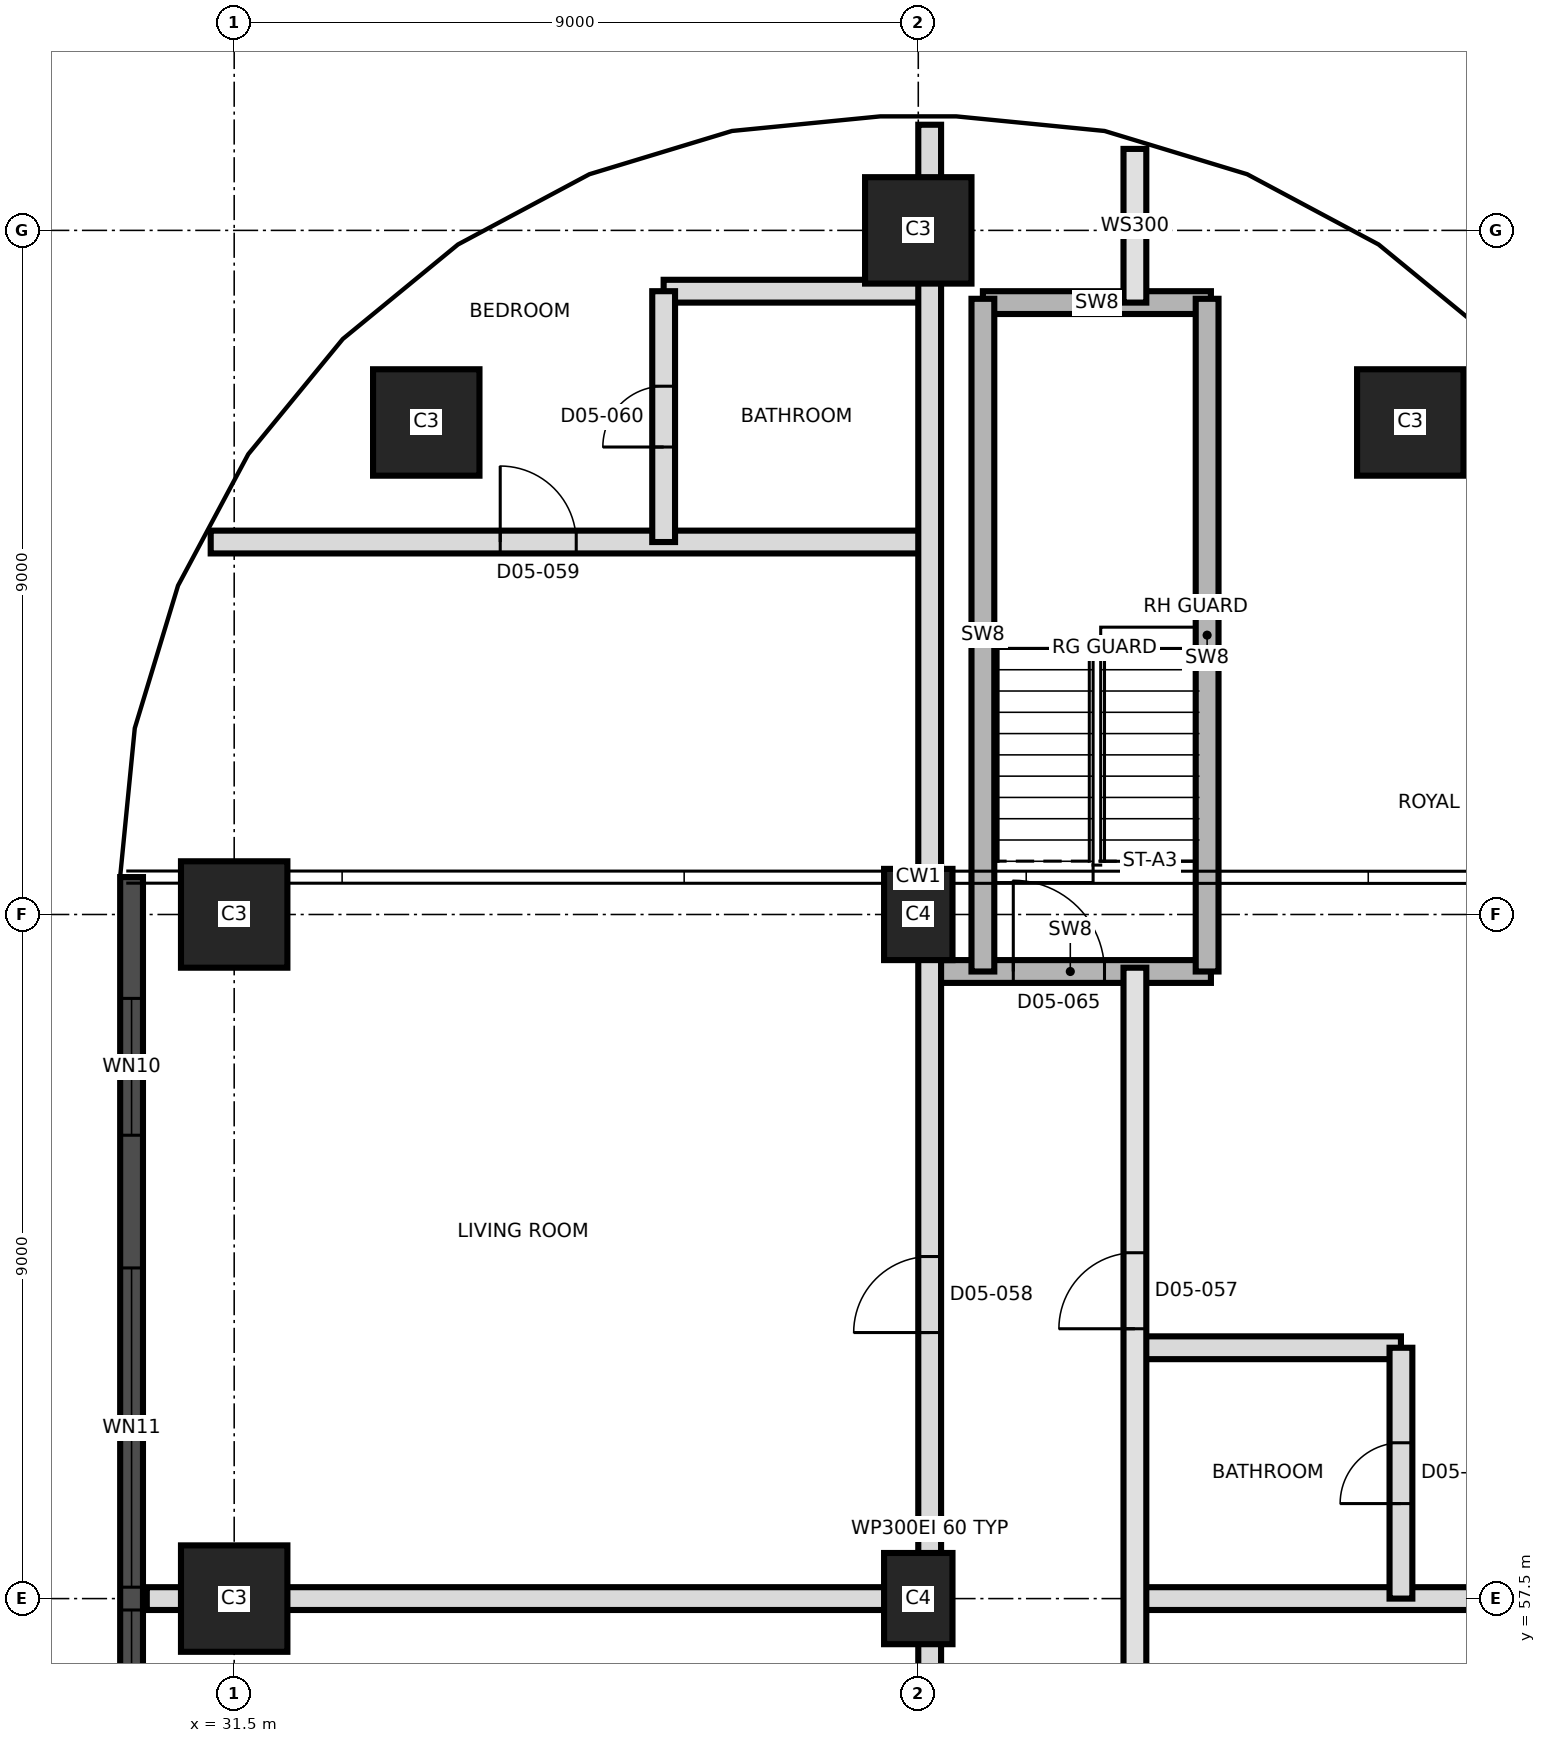
"""IFC4 building model, lengths in metres.
Left out: names, types, materials, properties, quantities, classifications, styles, units other than length and angle.
Written with IfcOpenShell. Run it as: python <this file> out.ifc"""

import sys

from ifc_helpers import new_model, si_unit, direction, frame, frame_2d, origin, origin_2d, place, context, subcontext, project, spatial, rectangle, extrude, element, fill, save


model = new_model("IFC4")
c1 = context("Model", 3, precision=1e-05, world=origin(), true_north=direction((0.0, 1.0)))
c2 = subcontext(c1, "Body", "Model", "MODEL_VIEW")
j1 = project(units=[si_unit("LENGTHUNIT", "METRE"), si_unit("PLANEANGLEUNIT", "RADIAN")], contexts=[c1])
p1 = place(None, origin())
s1 = spatial("IfcSite", under=j1, at=p1, CompositionType="ELEMENT")
p2 = place(p1, origin())
s2 = spatial("IfcBuilding", under=s1, at=p2, CompositionType="ELEMENT")
p3 = place(p2, frame((0.0, 0.0, 77.9)))
s3 = spatial("IfcBuildingStorey", under=s2, at=p3, CompositionType="ELEMENT", Elevation=77.9)
p4 = place(p3, frame((31.5, 57.5, 0.0), z_axis=(0.0, 0.0, 1.0), x_axis=(1.0, 0.0, 0.0)))
e1 = element("IfcColumn", 1, at=p4, inside=s3, PredefinedType="COLUMN", context=c2, shape_type="SweptSolid", body=[
    extrude(rectangle(XDim=1.4, YDim=1.4, at=origin_2d()), origin(), (0.0, 0.0, 1.0), 3.7),
])
p5 = place(p3, frame((40.5, 57.5, 0.0), z_axis=(0.0, 0.0, 1.0), x_axis=(0.0, 1.0, 0.0)))
e2 = element("IfcColumn", 2, at=p5, inside=s3, PredefinedType="COLUMN", context=c2, shape_type="SweptSolid", body=[
    extrude(rectangle(XDim=1.2, YDim=0.9, at=origin_2d()), origin(), (0.0, 0.0, 1.0), 3.7),
])
p6 = place(p3, frame((31.5, 66.5, 0.0), z_axis=(0.0, 0.0, 1.0), x_axis=(1.0, 0.0, 0.0)))
e3 = element("IfcColumn", 3, at=p6, inside=s3, PredefinedType="COLUMN", context=c2, shape_type="SweptSolid", body=[
    extrude(rectangle(XDim=1.4, YDim=1.4, at=origin_2d()), origin(), (0.0, 0.0, 1.0), 3.7),
])
p7 = place(p3, frame((40.5, 66.5, 0.0), z_axis=(0.0, 0.0, 1.0), x_axis=(0.0, 1.0, 0.0)))
e4 = element("IfcColumn", 4, at=p7, inside=s3, PredefinedType="COLUMN", context=c2, shape_type="SweptSolid", body=[
    extrude(rectangle(XDim=1.2, YDim=0.9, at=origin_2d()), origin(), (0.0, 0.0, 1.0), 3.7),
])
for number, where, z_axis, x_axis in (
    (5, (34.027, 72.973, 0.0), (0.0, 0.0, 1.0), (1.0, 0.0, 0.0)),
    (6, (46.973, 72.973, 0.0), (0.0, 0.0, 1.0), (1.0, 0.0, 0.0)),
    (7, (40.5, 75.5, 0.0), (0.0, 0.0, 1.0), (1.0, 0.0, 0.0)),
):
    element("IfcColumn", number, at=place(p3, frame(where, z_axis=z_axis, x_axis=x_axis)), inside=s3, PredefinedType="COLUMN", context=c2, shape_type="SweptSolid", body=[
        extrude(rectangle(XDim=1.4, YDim=1.4, at=origin_2d()), origin(), (0.0, 0.0, 1.0), 3.7),
    ])
p8 = place(p3, frame((30.15, 66.992, 0.0), z_axis=(0.0, 0.0, 1.0), x_axis=(0.0, -1.0, 0.0)))
e8 = element("IfcWall", 8, at=p8, inside=s3, PredefinedType="SOLIDWALL", context=c2, shape_type="SweptSolid", body=[
    extrude(rectangle(XDim=32.968, YDim=0.3, at=frame_2d((16.484, 0.0))), origin(), (0.0, 0.0, 1.0), 3.4),
])
p9 = place(p8, frame((1.596, 0.0, 0.3)))
e9 = element("IfcOpeningElement", 9, at=p9, cuts=e8, PredefinedType="OPENING", context=c2, shape_type="SweptSolid", body=[
    extrude(rectangle(XDim=1.8, YDim=2.4, at=frame_2d((0.9, 1.2))), frame((0.0, 0.16, 0.0), z_axis=(0.0, -1.0, 0.0), x_axis=(1.0, 0.0, 0.0)), (0.0, 0.0, 1.0), 0.32),
])
p10 = place(p8, frame((5.142, 0.0, 0.9)))
e10 = element("IfcOpeningElement", 10, at=p10, cuts=e8, PredefinedType="OPENING", context=c2, shape_type="SweptSolid", body=[
    extrude(rectangle(XDim=4.2, YDim=1.5, at=frame_2d((2.1, 0.75))), frame((0.0, 0.16, 0.0), z_axis=(0.0, -1.0, 0.0), x_axis=(1.0, 0.0, 0.0)), (0.0, 0.0, 1.0), 0.32),
])
p11 = place(p8, frame((9.642, 0.0, 0.9)))
e11 = element("IfcOpeningElement", 11, at=p11, cuts=e8, PredefinedType="OPENING", context=c2, shape_type="SweptSolid", body=[
    extrude(rectangle(XDim=4.2, YDim=1.5, at=frame_2d((2.1, 0.75))), frame((0.0, 0.16, 0.0), z_axis=(0.0, -1.0, 0.0), x_axis=(1.0, 0.0, 0.0)), (0.0, 0.0, 1.0), 0.32),
])
p12 = place(p8, frame((14.142, 0.0, 0.9)))
e12 = element("IfcOpeningElement", 12, at=p12, cuts=e8, PredefinedType="OPENING", context=c2, shape_type="SweptSolid", body=[
    extrude(rectangle(XDim=4.2, YDim=1.5, at=frame_2d((2.1, 0.75))), frame((0.0, 0.16, 0.0), z_axis=(0.0, -1.0, 0.0), x_axis=(1.0, 0.0, 0.0)), (0.0, 0.0, 1.0), 0.32),
])
p13 = place(p8, frame((18.642, 0.0, 0.9)))
e13 = element("IfcOpeningElement", 13, at=p13, cuts=e8, PredefinedType="OPENING", context=c2, shape_type="SweptSolid", body=[
    extrude(rectangle(XDim=4.2, YDim=1.5, at=frame_2d((2.1, 0.75))), frame((0.0, 0.16, 0.0), z_axis=(0.0, -1.0, 0.0), x_axis=(1.0, 0.0, 0.0)), (0.0, 0.0, 1.0), 0.32),
])
p14 = place(p8, frame((23.142, 0.0, 0.9)))
e14 = element("IfcOpeningElement", 14, at=p14, cuts=e8, PredefinedType="OPENING", context=c2, shape_type="SweptSolid", body=[
    extrude(rectangle(XDim=4.2, YDim=1.5, at=frame_2d((2.1, 0.75))), frame((0.0, 0.16, 0.0), z_axis=(0.0, -1.0, 0.0), x_axis=(1.0, 0.0, 0.0)), (0.0, 0.0, 1.0), 0.32),
])
p15 = place(p8, frame((29.33, 0.0, 0.3)))
e15 = element("IfcOpeningElement", 15, at=p15, cuts=e8, PredefinedType="OPENING", context=c2, shape_type="SweptSolid", body=[
    extrude(rectangle(XDim=1.8, YDim=2.4, at=frame_2d((0.9, 1.2))), frame((0.0, 0.16, 0.0), z_axis=(0.0, -1.0, 0.0), x_axis=(1.0, 0.0, 0.0)), (0.0, 0.0, 1.0), 0.32),
])
p16 = place(p3, frame((30.35, 57.5, 0.0), z_axis=(0.0, 0.0, 1.0), x_axis=(1.0, 0.0, 0.0)))
e16 = element("IfcWall", 16, at=p16, inside=s3, PredefinedType="PARTITIONING", context=c2, shape_type="SweptSolid", body=[
    extrude(rectangle(XDim=10.3, YDim=0.3, at=frame_2d((5.15, 0.0))), origin(), (0.0, 0.0, 1.0), 3.4),
])
p17 = place(p3, frame((43.35, 57.5, 0.0), z_axis=(0.0, 0.0, 1.0), x_axis=(1.0, 0.0, 0.0)))
e17 = element("IfcWall", 17, at=p17, inside=s3, PredefinedType="PARTITIONING", context=c2, shape_type="SweptSolid", body=[
    extrude(rectangle(XDim=7.48, YDim=0.3, at=frame_2d((3.74, 0.0))), origin(), (0.0, 0.0, 1.0), 3.4),
])
p18 = place(p3, frame((43.35, 60.8, 0.0), z_axis=(0.0, 0.0, 1.0), x_axis=(1.0, 0.0, 0.0)))
e18 = element("IfcWall", 18, at=p18, inside=s3, PredefinedType="PARTITIONING", context=c2, shape_type="SweptSolid", body=[
    extrude(rectangle(XDim=3.5, YDim=0.3, at=frame_2d((1.75, 0.0))), origin(), (0.0, 0.0, 1.0), 3.4),
])
p19 = place(p3, frame((40.65, 65.75, 0.0), z_axis=(0.0, 0.0, 1.0), x_axis=(1.0, 0.0, 0.0)))
e19 = element("IfcWall", 19, at=p19, inside=s3, PredefinedType="SHEAR", context=c2, shape_type="SweptSolid", body=[
    extrude(rectangle(XDim=3.7, YDim=0.3, at=frame_2d((1.85, 0.0))), origin(), (0.0, 0.0, 1.0), 3.4),
])
p20 = place(p19, frame((1.1, 0.0, 0.0)))
e20 = element("IfcOpeningElement", 20, at=p20, cuts=e19, PredefinedType="OPENING", context=c2, shape_type="SweptSolid", body=[
    extrude(rectangle(XDim=1.2, YDim=2.1, at=frame_2d((0.6, 1.05))), frame((0.0, 0.16, 0.0), z_axis=(0.0, -1.0, 0.0), x_axis=(1.0, 0.0, 0.0)), (0.0, 0.0, 1.0), 0.32),
])
p21 = place(p3, frame((31.191, 71.4, 0.0), z_axis=(0.0, 0.0, 1.0), x_axis=(1.0, 0.0, 0.0)))
e21 = element("IfcWall", 21, at=p21, inside=s3, PredefinedType="PARTITIONING", context=c2, shape_type="SweptSolid", body=[
    extrude(rectangle(XDim=9.459, YDim=0.3, at=frame_2d((4.729, 0.0))), origin(), (0.0, 0.0, 1.0), 3.4),
])
p22 = place(p21, frame((3.809, 0.0, 0.0)))
e22 = element("IfcOpeningElement", 22, at=p22, cuts=e21, PredefinedType="OPENING", context=c2, shape_type="SweptSolid", body=[
    extrude(rectangle(XDim=1.0, YDim=2.1, at=frame_2d((0.5, 1.05))), frame((0.0, 0.16, 0.0), z_axis=(0.0, -1.0, 0.0), x_axis=(1.0, 0.0, 0.0)), (0.0, 0.0, 1.0), 0.32),
])
p23 = place(p3, frame((41.35, 74.55, 0.0), z_axis=(0.0, 0.0, 1.0), x_axis=(1.0, 0.0, 0.0)))
e23 = element("IfcWall", 23, at=p23, inside=s3, PredefinedType="SHEAR", context=c2, shape_type="SweptSolid", body=[
    extrude(rectangle(XDim=3.0, YDim=0.3, at=frame_2d((1.5, 0.0))), origin(), (0.0, 0.0, 1.0), 3.4),
])
p24 = place(p3, frame((37.15, 74.7, 0.0), z_axis=(0.0, 0.0, 1.0), x_axis=(1.0, 0.0, 0.0)))
e24 = element("IfcWall", 24, at=p24, inside=s3, PredefinedType="PARTITIONING", context=c2, shape_type="SweptSolid", body=[
    extrude(rectangle(XDim=3.5, YDim=0.3, at=frame_2d((1.75, 0.0))), origin(), (0.0, 0.0, 1.0), 3.4),
])
p25 = place(p3, frame((37.15, 71.4, 0.0), z_axis=(0.0, 0.0, 1.0), x_axis=(0.0, 1.0, 0.0)))
e25 = element("IfcWall", 25, at=p25, inside=s3, PredefinedType="PARTITIONING", context=c2, shape_type="SweptSolid", body=[
    extrude(rectangle(XDim=3.3, YDim=0.3, at=frame_2d((1.65, 0.0))), origin(), (0.0, 0.0, 1.0), 3.4),
])
p26 = place(p25, frame((1.25, 0.0, 0.0)))
e26 = element("IfcOpeningElement", 26, at=p26, cuts=e25, PredefinedType="OPENING", context=c2, shape_type="SweptSolid", body=[
    extrude(rectangle(XDim=0.8, YDim=2.1, at=frame_2d((0.4, 1.05))), frame((0.0, 0.16, 0.0), z_axis=(0.0, -1.0, 0.0), x_axis=(1.0, 0.0, 0.0)), (0.0, 0.0, 1.0), 0.32),
])
p27 = place(p3, frame((40.65, 39.95, 0.0), z_axis=(0.0, 0.0, 1.0), x_axis=(0.0, 1.0, 0.0)))
e27 = element("IfcWall", 27, at=p27, inside=s3, PredefinedType="PARTITIONING", context=c2, shape_type="SweptSolid", body=[
    extrude(rectangle(XDim=36.94, YDim=0.3, at=frame_2d((18.47, 0.0))), origin(), (0.0, 0.0, 1.0), 3.4),
])
p28 = place(p27, frame((0.7, 0.0, 0.0)))
e28 = element("IfcOpeningElement", 28, at=p28, cuts=e27, PredefinedType="OPENING", context=c2, shape_type="SweptSolid", body=[
    extrude(rectangle(XDim=1.0, YDim=2.1, at=frame_2d((0.5, 1.05))), frame((0.0, 0.16, 0.0), z_axis=(0.0, -1.0, 0.0), x_axis=(1.0, 0.0, 0.0)), (0.0, 0.0, 1.0), 0.32),
])
p29 = place(p27, frame((6.55, 0.0, 0.0)))
e29 = element("IfcOpeningElement", 29, at=p29, cuts=e27, PredefinedType="OPENING", context=c2, shape_type="SweptSolid", body=[
    extrude(rectangle(XDim=1.0, YDim=2.1, at=frame_2d((0.5, 1.05))), frame((0.0, 0.16, 0.0), z_axis=(0.0, -1.0, 0.0), x_axis=(1.0, 0.0, 0.0)), (0.0, 0.0, 1.0), 0.32),
])
p30 = place(p27, frame((9.22, 0.0, 0.0)))
e30 = element("IfcOpeningElement", 30, at=p30, cuts=e27, PredefinedType="OPENING", context=c2, shape_type="SweptSolid", body=[
    extrude(rectangle(XDim=1.0, YDim=2.1, at=frame_2d((0.5, 1.05))), frame((0.0, 0.16, 0.0), z_axis=(0.0, -1.0, 0.0), x_axis=(1.0, 0.0, 0.0)), (0.0, 0.0, 1.0), 0.32),
])
p31 = place(p27, frame((15.07, 0.0, 0.0)))
e31 = element("IfcOpeningElement", 31, at=p31, cuts=e27, PredefinedType="OPENING", context=c2, shape_type="SweptSolid", body=[
    extrude(rectangle(XDim=1.0, YDim=2.1, at=frame_2d((0.5, 1.05))), frame((0.0, 0.16, 0.0), z_axis=(0.0, -1.0, 0.0), x_axis=(1.0, 0.0, 0.0)), (0.0, 0.0, 1.0), 0.32),
])
p32 = place(p27, frame((21.05, 0.0, 0.0)))
e32 = element("IfcOpeningElement", 32, at=p32, cuts=e27, PredefinedType="OPENING", context=c2, shape_type="SweptSolid", body=[
    extrude(rectangle(XDim=1.0, YDim=2.4, at=frame_2d((0.5, 1.2))), frame((0.0, 0.16, 0.0), z_axis=(0.0, -1.0, 0.0), x_axis=(1.0, 0.0, 0.0)), (0.0, 0.0, 1.0), 0.32),
])
p33 = place(p3, frame((41.35, 65.75, 0.0), z_axis=(0.0, 0.0, 1.0), x_axis=(0.0, 1.0, 0.0)))
e33 = element("IfcWall", 33, at=p33, inside=s3, PredefinedType="SHEAR", context=c2, shape_type="SweptSolid", body=[
    extrude(rectangle(XDim=8.85, YDim=0.3, at=frame_2d((4.425, 0.0))), origin(), (0.0, 0.0, 1.0), 3.4),
])
p34 = place(p3, frame((43.35, 39.95, 0.0), z_axis=(0.0, 0.0, 1.0), x_axis=(0.0, 1.0, 0.0)))
e34 = element("IfcWall", 34, at=p34, inside=s3, PredefinedType="SOLIDWALL", context=c2, shape_type="SweptSolid", body=[
    extrude(rectangle(XDim=25.85, YDim=0.3, at=frame_2d((12.925, 0.0))), origin(), (0.0, 0.0, 1.0), 3.4),
])
p35 = place(p34, frame((3.55, 0.0, 0.0)))
e35 = element("IfcOpeningElement", 35, at=p35, cuts=e34, PredefinedType="OPENING", context=c2, shape_type="SweptSolid", body=[
    extrude(rectangle(XDim=1.0, YDim=2.4, at=frame_2d((0.5, 1.2))), frame((0.0, 0.16, 0.0), z_axis=(0.0, -1.0, 0.0), x_axis=(1.0, 0.0, 0.0)), (0.0, 0.0, 1.0), 0.32),
])
p36 = place(p34, frame((9.7, 0.0, 0.0)))
e36 = element("IfcOpeningElement", 36, at=p36, cuts=e34, PredefinedType="OPENING", context=c2, shape_type="SweptSolid", body=[
    extrude(rectangle(XDim=1.0, YDim=2.1, at=frame_2d((0.5, 1.05))), frame((0.0, 0.16, 0.0), z_axis=(0.0, -1.0, 0.0), x_axis=(1.0, 0.0, 0.0)), (0.0, 0.0, 1.0), 0.32),
])
p37 = place(p34, frame((15.55, 0.0, 0.0)))
e37 = element("IfcOpeningElement", 37, at=p37, cuts=e34, PredefinedType="OPENING", context=c2, shape_type="SweptSolid", body=[
    extrude(rectangle(XDim=1.0, YDim=2.1, at=frame_2d((0.5, 1.05))), frame((0.0, 0.16, 0.0), z_axis=(0.0, -1.0, 0.0), x_axis=(1.0, 0.0, 0.0)), (0.0, 0.0, 1.0), 0.32),
])
p38 = place(p34, frame((21.1, 0.0, 0.0)))
e38 = element("IfcOpeningElement", 38, at=p38, cuts=e34, PredefinedType="OPENING", context=c2, shape_type="SweptSolid", body=[
    extrude(rectangle(XDim=1.0, YDim=2.4, at=frame_2d((0.5, 1.2))), frame((0.0, 0.16, 0.0), z_axis=(0.0, -1.0, 0.0), x_axis=(1.0, 0.0, 0.0)), (0.0, 0.0, 1.0), 0.32),
])
p39 = place(p3, frame((43.35, 74.55, 0.0), z_axis=(0.0, 0.0, 1.0), x_axis=(0.0, 1.0, 0.0)))
e39 = element("IfcWall", 39, at=p39, inside=s3, PredefinedType="SOLIDWALL", context=c2, shape_type="SweptSolid", body=[
    extrude(rectangle(XDim=2.022, YDim=0.3, at=frame_2d((1.011, 0.0))), origin(), (0.0, 0.0, 1.0), 3.4),
])
p40 = place(p3, frame((44.3, 65.75, 0.0), z_axis=(0.0, 0.0, 1.0), x_axis=(0.0, 1.0, 0.0)))
e40 = element("IfcWall", 40, at=p40, inside=s3, PredefinedType="SHEAR", context=c2, shape_type="SweptSolid", body=[
    extrude(rectangle(XDim=8.85, YDim=0.3, at=frame_2d((4.425, 0.0))), origin(), (0.0, 0.0, 1.0), 3.4),
])
p41 = place(p3, frame((46.85, 57.5, 0.0), z_axis=(0.0, 0.0, 1.0), x_axis=(0.0, 1.0, 0.0)))
e41 = element("IfcWall", 41, at=p41, inside=s3, PredefinedType="PARTITIONING", context=c2, shape_type="SweptSolid", body=[
    extrude(rectangle(XDim=3.3, YDim=0.3, at=frame_2d((1.65, 0.0))), origin(), (0.0, 0.0, 1.0), 3.4),
])
p42 = place(p41, frame((1.25, 0.0, 0.0)))
e42 = element("IfcOpeningElement", 42, at=p42, cuts=e41, PredefinedType="OPENING", context=c2, shape_type="SweptSolid", body=[
    extrude(rectangle(XDim=0.8, YDim=2.1, at=frame_2d((0.4, 1.05))), frame((0.0, 0.16, 0.0), z_axis=(0.0, -1.0, 0.0), x_axis=(1.0, 0.0, 0.0)), (0.0, 0.0, 1.0), 0.32),
])
p43 = place(p9, origin())
e43 = element("IfcWindow", 43, at=p43, inside=s3, PartitioningType="SINGLE_PANEL", PredefinedType="WINDOW", context=c2, shape_type="SweptSolid", body=[
    extrude(rectangle(XDim=1.8, YDim=2.4, at=frame_2d((0.9, 1.2))), frame((0.0, 0.03, 0.0), z_axis=(0.0, -1.0, 0.0), x_axis=(1.0, 0.0, 0.0)), (0.0, 0.0, 1.0), 0.06),
])
fill(e9, e43)
p44 = place(p10, origin())
e44 = element("IfcWindow", 44, at=p44, inside=s3, PartitioningType="SINGLE_PANEL", PredefinedType="WINDOW", context=c2, shape_type="SweptSolid", body=[
    extrude(rectangle(XDim=4.2, YDim=1.5, at=frame_2d((2.1, 0.75))), frame((0.0, 0.03, 0.0), z_axis=(0.0, -1.0, 0.0), x_axis=(1.0, 0.0, 0.0)), (0.0, 0.0, 1.0), 0.06),
])
fill(e10, e44)
p45 = place(p11, origin())
e45 = element("IfcWindow", 45, at=p45, inside=s3, PartitioningType="SINGLE_PANEL", PredefinedType="WINDOW", context=c2, shape_type="SweptSolid", body=[
    extrude(rectangle(XDim=4.2, YDim=1.5, at=frame_2d((2.1, 0.75))), frame((0.0, 0.03, 0.0), z_axis=(0.0, -1.0, 0.0), x_axis=(1.0, 0.0, 0.0)), (0.0, 0.0, 1.0), 0.06),
])
fill(e11, e45)
p46 = place(p42, origin())
e46 = element("IfcDoor", 46, at=p46, inside=s3, OperationType="SINGLE_SWING_LEFT", PredefinedType="DOOR", context=c2, shape_type="SweptSolid", body=[
    extrude(rectangle(XDim=0.8, YDim=2.1, at=frame_2d((0.4, 1.05))), frame((0.0, 0.025, 0.0), z_axis=(0.0, -1.0, 0.0), x_axis=(1.0, 0.0, 0.0)), (0.0, 0.0, 1.0), 0.05),
])
fill(e42, e46)
p47 = place(p38, origin())
e47 = element("IfcDoor", 47, at=p47, inside=s3, OperationType="SINGLE_SWING_LEFT", PredefinedType="DOOR", context=c2, shape_type="SweptSolid", body=[
    extrude(rectangle(XDim=1.0, YDim=2.4, at=frame_2d((0.5, 1.2))), frame((0.0, 0.025, 0.0), z_axis=(0.0, -1.0, 0.0), x_axis=(1.0, 0.0, 0.0)), (0.0, 0.0, 1.0), 0.05),
])
fill(e38, e47)
p48 = place(p32, origin())
e48 = element("IfcDoor", 48, at=p48, inside=s3, OperationType="SINGLE_SWING_RIGHT", PredefinedType="DOOR", context=c2, shape_type="SweptSolid", body=[
    extrude(rectangle(XDim=1.0, YDim=2.4, at=frame_2d((0.5, 1.2))), frame((0.0, 0.025, 0.0), z_axis=(0.0, -1.0, 0.0), x_axis=(1.0, 0.0, 0.0)), (0.0, 0.0, 1.0), 0.05),
])
fill(e32, e48)
p49 = place(p22, origin())
e49 = element("IfcDoor", 49, at=p49, inside=s3, OperationType="SINGLE_SWING_LEFT", PredefinedType="DOOR", context=c2, shape_type="SweptSolid", body=[
    extrude(rectangle(XDim=1.0, YDim=2.1, at=frame_2d((0.5, 1.05))), frame((0.0, 0.025, 0.0), z_axis=(0.0, -1.0, 0.0), x_axis=(1.0, 0.0, 0.0)), (0.0, 0.0, 1.0), 0.05),
])
fill(e22, e49)
p50 = place(p26, origin())
e50 = element("IfcDoor", 50, at=p50, inside=s3, OperationType="SINGLE_SWING_LEFT", PredefinedType="DOOR", context=c2, shape_type="SweptSolid", body=[
    extrude(rectangle(XDim=0.8, YDim=2.1, at=frame_2d((0.4, 1.05))), frame((0.0, 0.025, 0.0), z_axis=(0.0, -1.0, 0.0), x_axis=(1.0, 0.0, 0.0)), (0.0, 0.0, 1.0), 0.05),
])
fill(e26, e50)
p51 = place(p20, origin())
e51 = element("IfcDoor", 51, at=p51, inside=s3, OperationType="SINGLE_SWING_RIGHT", PredefinedType="DOOR", context=c2, shape_type="SweptSolid", body=[
    extrude(rectangle(XDim=1.2, YDim=2.1, at=frame_2d((0.6, 1.05))), frame((0.0, 0.025, 0.0), z_axis=(0.0, -1.0, 0.0), x_axis=(1.0, 0.0, 0.0)), (0.0, 0.0, 1.0), 0.05),
])
fill(e20, e51)
save(model, sys.argv[1])
